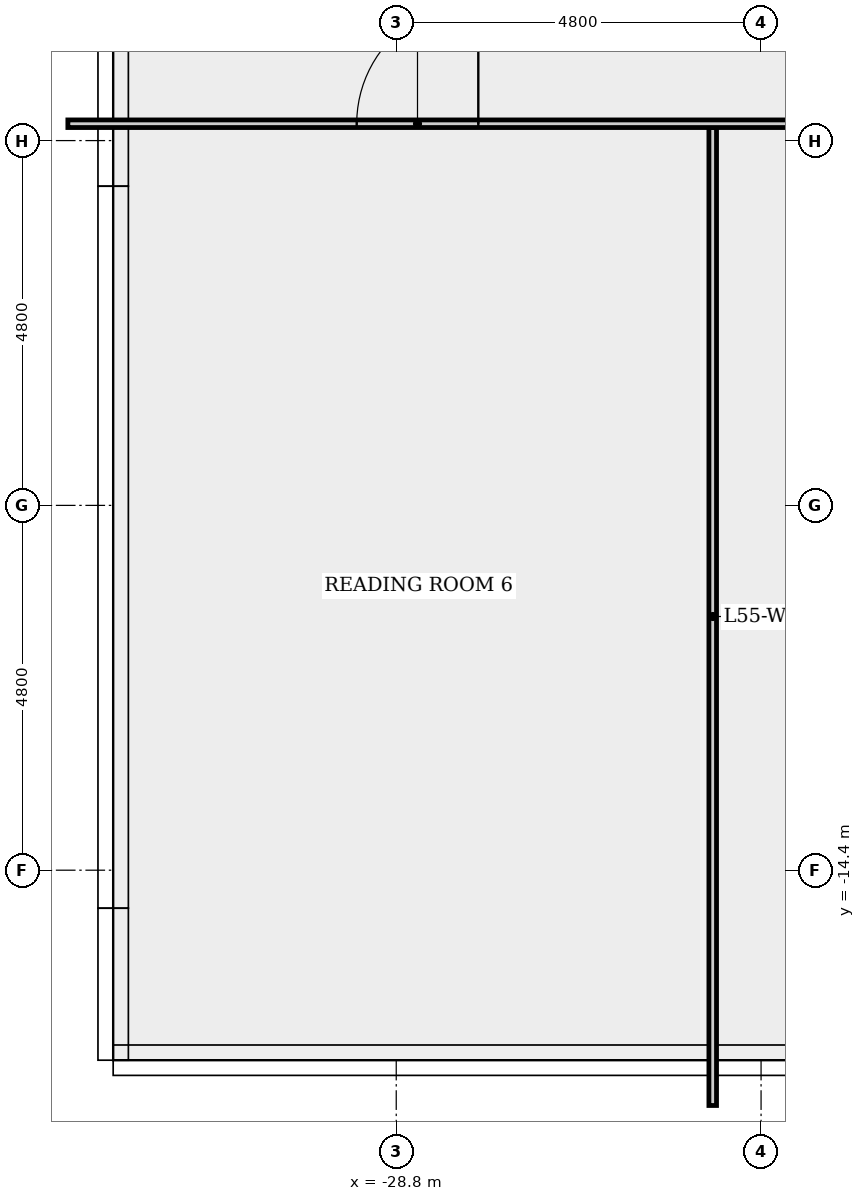
"""IFC4 building model, lengths in metres.
Left out: names, types, materials, properties, quantities, classifications, styles, units other than length and angle.
Written with IfcOpenShell. Run it as: python <this file> out.ifc"""

import sys

from ifc_helpers import new_model, si_unit, direction, frame, frame_2d, origin, place, context, subcontext, project, spatial, rectangle, extrude, element, fill, save


model = new_model("IFC4")
c1 = context("Model", 3, precision=1e-05, world=origin(), true_north=direction((0.0, 1.0)))
c2 = subcontext(c1, "Body", "Model", "MODEL_VIEW")
j1 = project(units=[si_unit("LENGTHUNIT", "METRE"), si_unit("PLANEANGLEUNIT", "RADIAN")], contexts=[c1])
p1 = place(None, origin())
s1 = spatial("IfcSite", under=j1, at=p1, CompositionType="ELEMENT")
p2 = place(p1, origin())
s2 = spatial("IfcBuilding", under=s1, at=p2, CompositionType="ELEMENT")
p3 = place(p2, frame((0.0, 0.0, 206.1)))
s3 = spatial("IfcBuildingStorey", under=s2, at=p3, CompositionType="ELEMENT", Elevation=206.1)
p4 = place(p3, frame((-24.636, -17.496, 0.0), z_axis=(0.0, 0.0, 1.0), x_axis=(0.0, 1.0, 0.0)))
e1 = element("IfcWall", 1, at=p4, inside=s3, PredefinedType="PARTITIONING", context=c2, shape_type="SweptSolid", body=[
    extrude(rectangle(XDim=12.868, YDim=0.1, at=frame_2d((6.434, 0.0))), origin(), (0.0, 0.0, 1.0), 3.6),
])
p5 = place(p3, frame((-33.12, -4.578, 0.0), z_axis=(0.0, 0.0, 1.0), x_axis=(1.0, 0.0, 0.0)))
e2 = element("IfcWall", 2, at=p5, inside=s3, PredefinedType="PARTITIONING", context=c2, shape_type="SweptSolid", body=[
    extrude(rectangle(XDim=21.895, YDim=0.1, at=frame_2d((10.948, 0.0))), origin(), (0.0, 0.0, 1.0), 3.6),
])
p6 = place(p5, frame((17.302, 0.0, 0.0)))
e3 = element("IfcOpeningElement", 3, at=p6, cuts=e2, PredefinedType="OPENING", context=c2, shape_type="SweptSolid", body=[
    extrude(rectangle(XDim=1.6, YDim=2.1, at=frame_2d((0.8, 1.05))), frame((0.0, 0.06, 0.0), z_axis=(0.0, -1.0, 0.0), x_axis=(1.0, 0.0, 0.0)), (0.0, 0.0, 1.0), 0.12),
])
p7 = place(p5, frame((10.582, 0.0, 0.0)))
e4 = element("IfcOpeningElement", 4, at=p7, cuts=e2, PredefinedType="OPENING", context=c2, shape_type="SweptSolid", body=[
    extrude(rectangle(XDim=1.6, YDim=2.1, at=frame_2d((0.8, 1.05))), frame((0.0, 0.06, 0.0), z_axis=(0.0, -1.0, 0.0), x_axis=(1.0, 0.0, 0.0)), (0.0, 0.0, 1.0), 0.12),
])
p8 = place(p5, frame((3.8, 0.0, 0.0)))
e5 = element("IfcOpeningElement", 5, at=p8, cuts=e2, PredefinedType="OPENING", context=c2, shape_type="SweptSolid", body=[
    extrude(rectangle(XDim=1.6, YDim=2.1, at=frame_2d((0.8, 1.05))), frame((0.0, 0.06, 0.0), z_axis=(0.0, -1.0, 0.0), x_axis=(1.0, 0.0, 0.0)), (0.0, 0.0, 1.0), 0.12),
])
p9 = place(p8, origin())
e6 = element("IfcDoor", 6, at=p9, inside=s3, OperationType="SINGLE_SWING_RIGHT", PredefinedType="DOOR", context=c2, shape_type="SweptSolid", body=[
    extrude(rectangle(XDim=1.6, YDim=2.1, at=frame_2d((0.8, 1.05))), frame((0.0, 0.025, 0.0), z_axis=(0.0, -1.0, 0.0), x_axis=(1.0, 0.0, 0.0)), (0.0, 0.0, 1.0), 0.05),
])
fill(e5, e6)
save(model, sys.argv[1])
